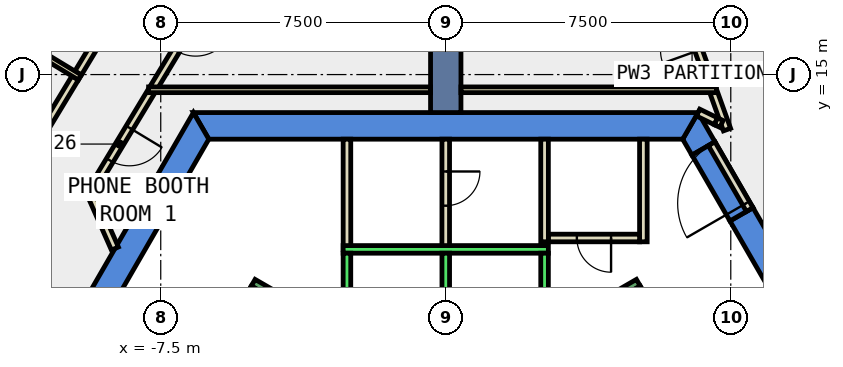
"""IFC4 building model, lengths in metres.
Left out: names, types, materials, properties, quantities, classifications, styles, units other than length and angle.
Written with IfcOpenShell. Run it as: python <this file> out.ifc"""

import sys

from ifc_helpers import new_model, si_unit, direction, frame, frame_2d, origin, place, context, subcontext, project, spatial, polyline, rectangle, outline, extrude, element, fill, save


model = new_model("IFC4")
c1 = context("Model", 3, precision=1e-05, world=origin(), true_north=direction((0.0, 1.0)))
c2 = subcontext(c1, "Body", "Model", "MODEL_VIEW")
j1 = project(units=[si_unit("LENGTHUNIT", "METRE"), si_unit("PLANEANGLEUNIT", "RADIAN")], contexts=[c1])
p1 = place(None, origin())
s1 = spatial("IfcSite", under=j1, at=p1, CompositionType="ELEMENT")
p2 = place(p1, origin())
s2 = spatial("IfcBuilding", under=s1, at=p2, CompositionType="ELEMENT")
p3 = place(p2, frame((0.0, 0.0, 198.2)))
s3 = spatial("IfcBuildingStorey", under=s2, at=p3, CompositionType="ELEMENT", Elevation=198.2)
p4 = place(p3, frame((0.0, 0.0, -0.4)))
e1 = element("IfcWall", 1, at=p4, inside=s3, PredefinedType="SHEAR", context=c2, shape_type="SweptSolid", body=[
    extrude(outline(polyline([(8.084, 11.498), (7.478, 11.148), (12.471, 2.5), (13.279, 2.5), (8.084, 11.498)])), origin(), (0.0, 0.0, 1.0), 4.2),
])
p5 = place(p3, frame((0.0, 0.0, -0.4)))
e2 = element("IfcWall", 2, at=p5, inside=s3, PredefinedType="SHEAR", context=c2, shape_type="SweptSolid", body=[
    extrude(outline(polyline([(6.478, 12.88), (7.084, 13.23), (6.64, 14.0), (6.235, 13.3), (6.478, 12.88)])), origin(), (0.0, 0.0, 1.0), 4.2),
])
p6 = place(p3, frame((0.0, 0.0, 3.6)))
e3 = element("IfcWall", 3, at=p6, inside=s3, PredefinedType="SHEAR", context=c2, shape_type="SweptSolid", body=[
    extrude(outline(polyline([(7.084, 13.23), (6.478, 12.88), (7.478, 11.148), (8.084, 11.498), (7.084, 13.23)])), origin(), (0.0, 0.0, 1.0), 0.2),
])
p7 = place(p3, frame((0.0, 0.0, -0.4)))
e4 = element("IfcWall", 4, at=p7, inside=s3, PredefinedType="SHEAR", context=c2, shape_type="SweptSolid", body=[
    extrude(outline(polyline([(6.64, 14.0), (-6.64, 14.0), (-6.235, 13.3), (6.235, 13.3), (6.64, 14.0)])), origin(), (0.0, 0.0, 1.0), 4.2),
])
p8 = place(p3, frame((0.0, 0.0, -0.4)))
e5 = element("IfcWall", 5, at=p8, inside=s3, PredefinedType="SHEAR", context=c2, shape_type="SweptSolid", body=[
    extrude(outline(polyline([(-11.834, 5.002), (-11.228, 4.652), (-6.235, 13.3), (-6.64, 14.0), (-11.834, 5.002)])), origin(), (0.0, 0.0, 1.0), 4.2),
])
p9 = place(p3, frame((0.0, 14.0, -0.4), z_axis=(0.0, 0.0, 1.0), x_axis=(0.0, 1.0, 0.0)))
e6 = element("IfcWall", 6, at=p9, inside=s3, PredefinedType="SHEAR", context=c2, shape_type="SweptSolid", body=[
    extrude(rectangle(XDim=9.0, YDim=0.8, at=frame_2d((4.5, 0.0))), origin(), (0.0, 0.0, 1.0), 4.2),
])
p10 = place(p3, frame((6.64, 14.0, 0.0), z_axis=(0.0, 0.0, 1.0), x_axis=(0.899046412443, -0.437853341055, 0.0)))
e7 = element("IfcWall", 7, at=p10, inside=s3, PredefinedType="PARTITIONING", context=c2, shape_type="SweptSolid", body=[
    extrude(rectangle(XDim=0.523, YDim=0.2, at=frame_2d((0.261, 0.0))), origin(), (0.0, 0.0, 1.0), 3.8),
])
p11 = place(p3, frame((7.401, 13.552, 0.0), z_axis=(0.0, 0.0, 1.0), x_axis=(-0.337944878606, 0.941165904091, 0.0)))
e8 = element("IfcWall", 8, at=p11, inside=s3, PredefinedType="PARTITIONING", context=c2, shape_type="SweptSolid", body=[
    extrude(rectangle(XDim=1.038, YDim=0.2, at=frame_2d((0.519, 0.0))), origin(), (0.0, 0.0, 1.0), 3.8),
])
p12 = place(p3, frame((-7.759, 14.536, 0.0), z_axis=(0.0, 0.0, 1.0), x_axis=(-0.516926279395, -0.856029918678, 0.0)))
e9 = element("IfcWall", 9, at=p12, inside=s3, PredefinedType="PARTITIONING", context=c2, shape_type="SweptSolid", body=[
    extrude(rectangle(XDim=3.188, YDim=0.2, at=frame_2d((1.594, 0.0))), origin(), (0.0, 0.0, 1.0), 3.8),
])
p13 = place(p12, frame((1.094, 0.0, 0.0)))
e10 = element("IfcOpeningElement", 10, at=p13, cuts=e9, PredefinedType="OPENING", context=c2, shape_type="SweptSolid", body=[
    extrude(rectangle(XDim=1.0, YDim=2.1, at=frame_2d((0.5, 1.05))), frame((0.0, 0.11, 0.0), z_axis=(0.0, -1.0, 0.0), x_axis=(1.0, 0.0, 0.0)), (0.0, 0.0, 1.0), 0.22),
])
p14 = place(p3, frame((-9.315, 11.801, 0.0), z_axis=(0.0, 0.0, 1.0), x_axis=(0.403943240321, -0.914784050254, 0.0)))
e11 = element("IfcWall", 11, at=p14, inside=s3, PredefinedType="PARTITIONING", context=c2, shape_type="SweptSolid", body=[
    extrude(rectangle(XDim=1.507, YDim=0.2, at=frame_2d((0.754, 0.0))), origin(), (0.0, 0.0, 1.0), 3.8),
])
p15 = place(p3, frame((6.999, 14.671, 0.0), z_axis=(0.0, 0.0, 1.0), x_axis=(-0.338795881304, 0.940859899672, 0.0)))
e12 = element("IfcWall", 12, at=p15, inside=s3, PredefinedType="PARTITIONING", context=c2, shape_type="SweptSolid", body=[
    extrude(rectangle(XDim=3.055, YDim=0.2, at=frame_2d((1.527, 0.0))), origin(), (0.0, 0.0, 1.0), 3.8),
])
p16 = place(p15, frame((1.027, 0.0, 0.0)))
e13 = element("IfcOpeningElement", 13, at=p16, cuts=e12, PredefinedType="OPENING", context=c2, shape_type="SweptSolid", body=[
    extrude(rectangle(XDim=1.0, YDim=2.1, at=frame_2d((0.5, 1.05))), frame((0.0, 0.11, 0.0), z_axis=(0.0, -1.0, 0.0), x_axis=(1.0, 0.0, 0.0)), (0.0, 0.0, 1.0), 0.22),
])
p17 = place(p3, frame((-5.998, 17.451, 0.0), z_axis=(0.0, 0.0, 1.0), x_axis=(-0.516919907997, -0.856033766108, 0.0)))
e14 = element("IfcWall", 14, at=p17, inside=s3, PredefinedType="PARTITIONING", context=c2, shape_type="SweptSolid", body=[
    extrude(rectangle(XDim=3.256, YDim=0.2, at=frame_2d((1.628, 0.0))), origin(), (0.0, 0.0, 1.0), 3.8),
])
p18 = place(p17, frame((1.128, 0.0, 0.0)))
e15 = element("IfcOpeningElement", 15, at=p18, cuts=e14, PredefinedType="OPENING", context=c2, shape_type="SweptSolid", body=[
    extrude(rectangle(XDim=1.0, YDim=2.1, at=frame_2d((0.5, 1.05))), frame((0.0, 0.11, 0.0), z_axis=(0.0, -1.0, 0.0), x_axis=(1.0, 0.0, 0.0)), (0.0, 0.0, 1.0), 0.22),
])
p19 = place(p3, frame((7.615, 18.449, 0.0), z_axis=(0.0, 0.0, 1.0), x_axis=(0.516918251554, -0.856034766356, 0.0)))
e16 = element("IfcWall", 16, at=p19, inside=s3, PredefinedType="PARTITIONING", context=c2, shape_type="SweptSolid", body=[
    extrude(rectangle(XDim=3.983, YDim=0.2, at=frame_2d((1.992, 0.0))), origin(), (0.0, 0.0, 1.0), 3.8),
])
p20 = place(p19, frame((1.492, 0.0, 0.0)))
e17 = element("IfcOpeningElement", 17, at=p20, cuts=e16, PredefinedType="OPENING", context=c2, shape_type="SweptSolid", body=[
    extrude(rectangle(XDim=1.0, YDim=2.1, at=frame_2d((0.5, 1.05))), frame((0.0, 0.11, 0.0), z_axis=(0.0, -1.0, 0.0), x_axis=(1.0, 0.0, 0.0)), (0.0, 0.0, 1.0), 0.22),
])
p21 = place(p3, frame((-9.674, 15.039, 0.0), z_axis=(0.0, 0.0, 1.0), x_axis=(0.516918251554, 0.856034766356, 0.0)))
e18 = element("IfcWall", 18, at=p21, inside=s3, PredefinedType="PARTITIONING", context=c2, shape_type="SweptSolid", body=[
    extrude(rectangle(XDim=3.983, YDim=0.2, at=frame_2d((1.992, 0.0))), origin(), (0.0, 0.0, 1.0), 3.8),
])
p22 = place(p3, frame((-11.811, 11.503, 0.0), z_axis=(0.0, 0.0, 1.0), x_axis=(0.517135291957, 0.855903668535, 0.0)))
e19 = element("IfcWall", 19, at=p22, inside=s3, PredefinedType="PARTITIONING", context=c2, shape_type="SweptSolid", body=[
    extrude(rectangle(XDim=3.982, YDim=0.2, at=frame_2d((1.991, 0.0))), origin(), (0.0, 0.0, 1.0), 3.8),
])
p23 = place(p3, frame((5.2, 13.3, 0.0), z_axis=(0.0, 0.0, 1.0), x_axis=(0.0, -1.0, 0.0)))
e20 = element("IfcWall", 20, at=p23, inside=s3, PredefinedType="PARTITIONING", context=c2, shape_type="SweptSolid", body=[
    extrude(rectangle(XDim=2.7, YDim=0.2, at=frame_2d((1.35, 0.0))), origin(), (0.0, 0.0, 1.0), 3.8),
])
p24 = place(p3, frame((5.1, 10.7, 0.0), z_axis=(0.0, 0.0, 1.0), x_axis=(-1.0, 0.0, 0.0)))
e21 = element("IfcWall", 21, at=p24, inside=s3, PredefinedType="PARTITIONING", context=c2, shape_type="SweptSolid", body=[
    extrude(rectangle(XDim=2.4, YDim=0.2, at=frame_2d((1.2, 0.0))), origin(), (0.0, 0.0, 1.0), 3.8),
])
p25 = place(p24, frame((0.75, 0.0, 0.0)))
e22 = element("IfcOpeningElement", 22, at=p25, cuts=e21, PredefinedType="OPENING", context=c2, shape_type="SweptSolid", body=[
    extrude(rectangle(XDim=0.9, YDim=2.1, at=frame_2d((0.45, 1.05))), frame((0.0, 0.11, 0.0), z_axis=(0.0, -1.0, 0.0), x_axis=(1.0, 0.0, 0.0)), (0.0, 0.0, 1.0), 0.22),
])
p26 = place(p3, frame((2.6, 10.6, 0.0), z_axis=(0.0, 0.0, 1.0), x_axis=(0.0, 1.0, 0.0)))
e23 = element("IfcWall", 23, at=p26, inside=s3, PredefinedType="PARTITIONING", context=c2, shape_type="SweptSolid", body=[
    extrude(rectangle(XDim=2.7, YDim=0.2, at=frame_2d((1.35, 0.0))), origin(), (0.0, 0.0, 1.0), 3.8),
])
p27 = place(p3, frame((-2.599, 10.399, 0.0), z_axis=(0.0, 0.0, 1.0), x_axis=(-0.000336615314, 0.999999943345, 0.0)))
e24 = element("IfcWall", 24, at=p27, inside=s3, PredefinedType="PARTITIONING", context=c2, shape_type="SweptSolid", body=[
    extrude(rectangle(XDim=2.901, YDim=0.2, at=frame_2d((1.451, 0.0))), origin(), (0.0, 0.0, 1.0), 3.8),
])
p28 = place(p3, frame((0.0, 13.3, 0.0), z_axis=(0.0, 0.0, 1.0), x_axis=(-0.000336728662, -0.999999943307, 0.0)))
e25 = element("IfcWall", 25, at=p28, inside=s3, PredefinedType="PARTITIONING", context=c2, shape_type="SweptSolid", body=[
    extrude(rectangle(XDim=2.9, YDim=0.2, at=frame_2d((1.45, 0.0))), origin(), (0.0, 0.0, 1.0), 3.8),
])
p29 = place(p28, frame((0.85, 0.0, 0.0)))
e26 = element("IfcOpeningElement", 26, at=p29, cuts=e25, PredefinedType="OPENING", context=c2, shape_type="SweptSolid", body=[
    extrude(rectangle(XDim=0.9, YDim=2.1, at=frame_2d((0.45, 1.05))), frame((0.0, 0.11, 0.0), z_axis=(0.0, -1.0, 0.0), x_axis=(1.0, 0.0, 0.0)), (0.0, 0.0, 1.0), 0.22),
])
p30 = place(p3, frame((7.124, 14.6, 0.0), z_axis=(0.0, 0.0, 1.0), x_axis=(-1.0, 0.0, 0.0)))
e27 = element("IfcWall", 27, at=p30, inside=s3, PredefinedType="PARTITIONING", context=c2, shape_type="SweptSolid", body=[
    extrude(rectangle(XDim=6.724, YDim=0.15, at=frame_2d((3.362, 0.0))), origin(), (0.0, 0.0, 1.0), 3.8),
])
p31 = place(p3, frame((-0.4, 14.6, 0.0), z_axis=(0.0, 0.0, 1.0), x_axis=(-1.0, 0.0, 0.0)))
e28 = element("IfcWall", 28, at=p31, inside=s3, PredefinedType="PARTITIONING", context=c2, shape_type="SweptSolid", body=[
    extrude(rectangle(XDim=7.42, YDim=0.15, at=frame_2d((3.71, 0.0))), origin(), (0.0, 0.0, 1.0), 3.8),
])
p32 = place(p3, frame((-9.628, 14.924, 0.0), z_axis=(0.0, 0.0, 1.0), x_axis=(-0.855931736607, 0.517088834021, 0.0)))
e29 = element("IfcWall", 29, at=p32, inside=s3, PredefinedType="PARTITIONING", context=c2, shape_type="SweptSolid", body=[
    extrude(rectangle(XDim=5.699, YDim=0.15, at=frame_2d((2.85, 0.0))), origin(), (0.0, 0.0, 1.0), 3.8),
])
p33 = place(p3, frame((7.997, 11.448, 0.0), z_axis=(0.0, 0.0, 1.0), x_axis=(-0.50002537861, 0.866010750942, 0.0)))
e30 = element("IfcWall", 30, at=p33, inside=s3, PredefinedType="PARTITIONING", context=c2, shape_type="SweptSolid", body=[
    extrude(rectangle(XDim=2.0, YDim=0.2, at=frame_2d((1.0, 0.0))), origin(), (0.0, 0.0, 1.0), 2.4),
])
p34 = place(p33, frame((0.19, 0.0, 0.0)))
e31 = element("IfcOpeningElement", 31, at=p34, cuts=e30, PredefinedType="OPENING", context=c2, shape_type="SweptSolid", body=[
    extrude(rectangle(XDim=1.8, YDim=2.1, at=frame_2d((0.9, 1.05))), frame((0.0, 0.11, 0.0), z_axis=(0.0, -1.0, 0.0), x_axis=(1.0, 0.0, 0.0)), (0.0, 0.0, 1.0), 0.22),
])
p35 = place(p3, frame((7.11, 13.771, 0.0), z_axis=(0.0, 0.0, 1.0), x_axis=(0.900120852209, -0.435640277545, 0.0)))
e32 = element("IfcWall", 32, at=p35, inside=s3, PredefinedType="PARTITIONING", context=c2, shape_type="SweptSolid", body=[
    extrude(rectangle(XDim=0.161, YDim=0.2, at=frame_2d((0.081, 0.0))), origin(), (0.0, 0.0, 1.0), 2.4),
])
p36 = place(p3, frame((2.7, 10.4, 0.0), z_axis=(0.0, 0.0, 1.0), x_axis=(-1.0, 0.0, 0.0)))
e33 = element("IfcWall", 33, at=p36, inside=s3, PredefinedType="STANDARD", context=c2, shape_type="SweptSolid", body=[
    extrude(rectangle(XDim=5.4, YDim=0.2, at=frame_2d((2.7, 0.0))), origin(), (0.0, 0.0, 1.0), 3.8),
])
for number, where, z_axis, x_axis in (
    (34, (2.6, 7.9, 0.0), (0.0, 0.0, 1.0), (0.0, 1.0, 0.0)),
    (35, (0.0, 7.9, 0.0), (0.0, 0.0, 1.0), (0.0, 1.0, 0.0)),
    (36, (-2.6, 7.9, 0.0), (0.0, 0.0, 1.0), (0.0, 1.0, 0.0)),
):
    element("IfcWall", number, at=place(p3, frame(where, z_axis=z_axis, x_axis=x_axis)), inside=s3, PredefinedType="STANDARD", context=c2, shape_type="SweptSolid", body=[
        extrude(rectangle(XDim=2.4, YDim=0.2, at=frame_2d((1.2, 0.0))), origin(), (0.0, 0.0, 1.0), 3.8),
    ])
p37 = place(p3, frame((2.7, 8.158, 0.0), z_axis=(0.0, 0.0, 1.0), x_axis=(0.86611865017, 0.499838457731, 0.0)))
e37 = element("IfcWall", 37, at=p37, inside=s3, PredefinedType="STANDARD", context=c2, shape_type="SweptSolid", body=[
    extrude(rectangle(XDim=2.733, YDim=0.2, at=frame_2d((1.366, 0.0))), origin(), (0.0, 0.0, 1.0), 3.8),
])
p38 = place(p3, frame((8.48, 3.412, 0.0), z_axis=(0.0, 0.0, 1.0), x_axis=(-0.499978703459, 0.866037698999, 0.0)))
e38 = element("IfcWall", 38, at=p38, inside=s3, PredefinedType="STANDARD", context=c2, shape_type="SweptSolid", body=[
    extrude(rectangle(XDim=6.9, YDim=0.2, at=frame_2d((3.45, 0.0))), origin(), (0.0, 0.0, 1.0), 3.8),
])
p39 = place(p3, frame((-1.256, 7.324, 0.0), z_axis=(0.0, 0.0, 1.0), x_axis=(-0.866046073146, 0.499964197906, 0.0)))
e39 = element("IfcWall", 39, at=p39, inside=s3, PredefinedType="STANDARD", context=c2, shape_type="SweptSolid", body=[
    extrude(rectangle(XDim=4.4, YDim=0.2, at=frame_2d((2.2, 0.0))), origin(), (0.0, 0.0, 1.0), 3.8),
])
p40 = place(p39, frame((2.4, 0.0, 0.0)))
e40 = element("IfcOpeningElement", 40, at=p40, cuts=e39, PredefinedType="OPENING", context=c2, shape_type="SweptSolid", body=[
    extrude(rectangle(XDim=1.1, YDim=2.2, at=frame_2d((0.55, 1.1))), frame((0.0, 0.11, 0.0), z_axis=(0.0, -1.0, 0.0), x_axis=(1.0, 0.0, 0.0)), (0.0, 0.0, 1.0), 0.22),
])
p41 = place(p3, frame((-5.03, 9.388, 0.0), z_axis=(0.0, 0.0, 1.0), x_axis=(-0.499978703459, -0.866037698999, 0.0)))
e41 = element("IfcWall", 41, at=p41, inside=s3, PredefinedType="STANDARD", context=c2, shape_type="SweptSolid", body=[
    extrude(rectangle(XDim=6.9, YDim=0.2, at=frame_2d((3.45, 0.0))), origin(), (0.0, 0.0, 1.0), 3.8),
])
p42 = place(p13, origin())
e42 = element("IfcDoor", 42, at=p42, inside=s3, OperationType="SINGLE_SWING_LEFT", PredefinedType="DOOR", context=c2, shape_type="SweptSolid", body=[
    extrude(rectangle(XDim=1.0, YDim=2.1, at=frame_2d((0.5, 1.05))), frame((0.0, 0.025, 0.0), z_axis=(0.0, -1.0, 0.0), x_axis=(1.0, 0.0, 0.0)), (0.0, 0.0, 1.0), 0.05),
])
fill(e10, e42)
p43 = place(p25, origin())
e43 = element("IfcDoor", 43, at=p43, inside=s3, OperationType="SINGLE_SWING_RIGHT", PredefinedType="DOOR", context=c2, shape_type="SweptSolid", body=[
    extrude(rectangle(XDim=0.9, YDim=2.1, at=frame_2d((0.45, 1.05))), frame((0.0, 0.025, 0.0), z_axis=(0.0, -1.0, 0.0), x_axis=(1.0, 0.0, 0.0)), (0.0, 0.0, 1.0), 0.05),
])
fill(e22, e43)
p44 = place(p29, origin())
e44 = element("IfcDoor", 44, at=p44, inside=s3, OperationType="SINGLE_SWING_RIGHT", PredefinedType="DOOR", context=c2, shape_type="SweptSolid", body=[
    extrude(rectangle(XDim=0.9, YDim=2.1, at=frame_2d((0.45, 1.05))), frame((0.0, 0.025, 0.0), z_axis=(0.0, -1.0, 0.0), x_axis=(1.0, 0.0, 0.0)), (0.0, 0.0, 1.0), 0.05),
])
fill(e26, e44)
p45 = place(p34, origin())
e45 = element("IfcDoor", 45, at=p45, inside=s3, OperationType="DOUBLE_DOOR_SINGLE_SWING", PredefinedType="DOOR", context=c2, shape_type="SweptSolid", body=[
    extrude(rectangle(XDim=1.8, YDim=2.1, at=frame_2d((0.9, 1.05))), frame((0.0, 0.025, 0.0), z_axis=(0.0, -1.0, 0.0), x_axis=(1.0, 0.0, 0.0)), (0.0, 0.0, 1.0), 0.05),
])
fill(e31, e45)
save(model, sys.argv[1])
